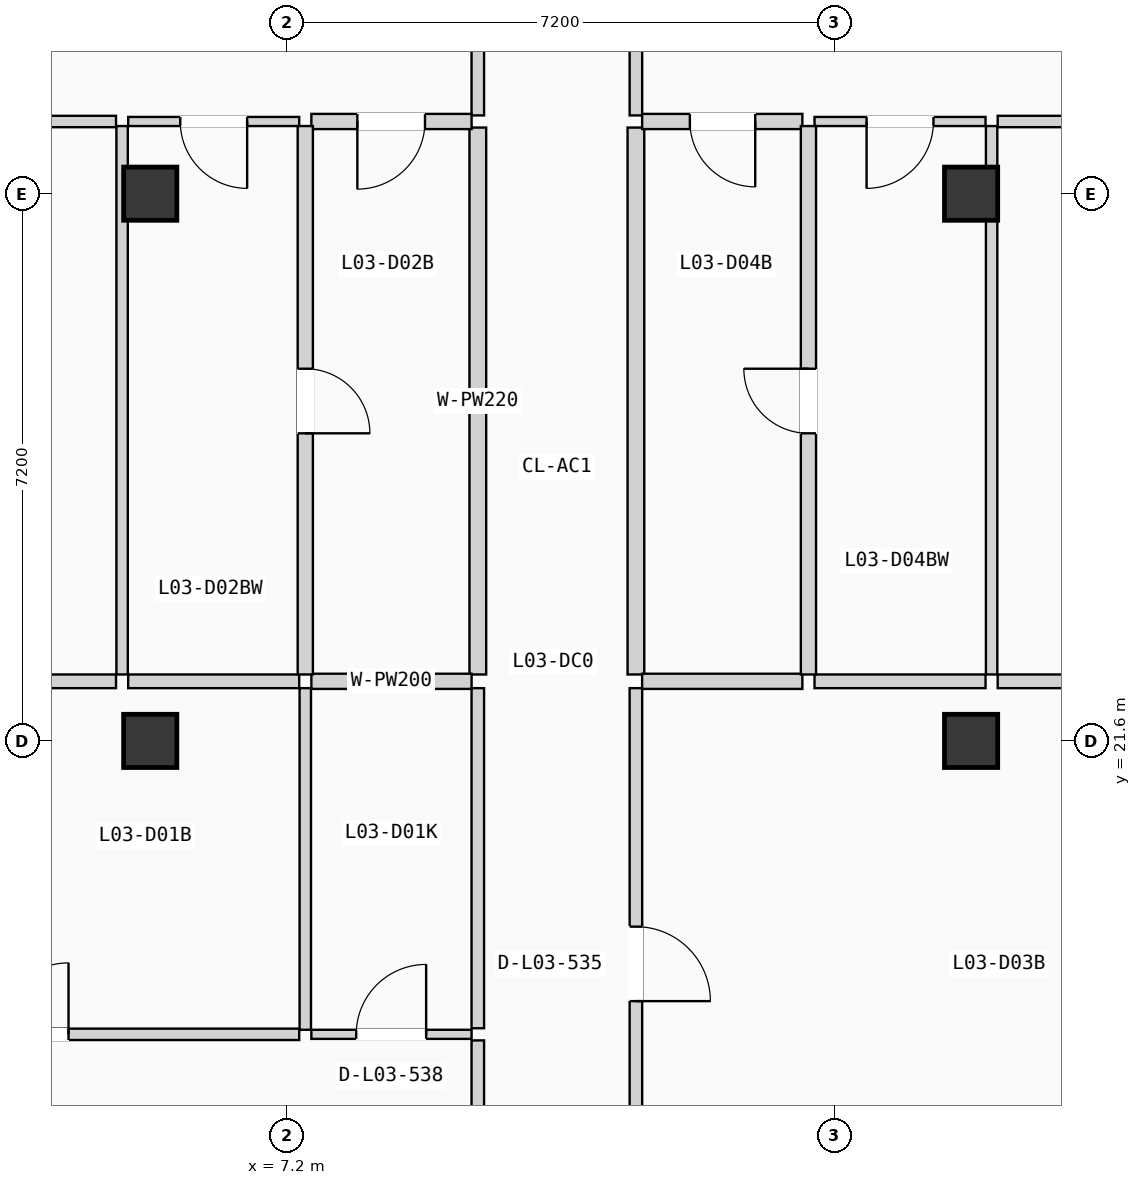
"""IFC4 building model, lengths in metres.
Left out: names, types, materials, properties, quantities, classifications, styles, units other than length and angle.
Written with IfcOpenShell. Run it as: python <this file> out.ifc"""

import sys

from ifc_helpers import new_model, si_unit, direction, frame, frame_2d, origin, origin_2d, place, context, subcontext, project, spatial, rectangle, extrude, element, fill, save


model = new_model("IFC4")
c1 = context("Model", 3, precision=1e-05, world=origin(), true_north=direction((0.0, 1.0)))
c2 = subcontext(c1, "Body", "Model", "MODEL_VIEW")
j1 = project(units=[si_unit("LENGTHUNIT", "METRE"), si_unit("PLANEANGLEUNIT", "RADIAN")], contexts=[c1])
p1 = place(None, origin())
s1 = spatial("IfcSite", under=j1, at=p1, CompositionType="ELEMENT")
p2 = place(p1, origin())
s2 = spatial("IfcBuilding", under=s1, at=p2, CompositionType="ELEMENT")
p3 = place(p2, frame((0.0, 0.0, 12.075)))
s3 = spatial("IfcBuildingStorey", under=s2, at=p3, CompositionType="ELEMENT", Elevation=12.075)
for number, where, z_axis, x_axis in (
    (1, (5.4, 21.6, 0.0), (0.0, 0.0, 1.0), (1.0, 0.0, 0.0)),
    (2, (5.4, 28.8, 0.0), (0.0, 0.0, 1.0), (1.0, 0.0, 0.0)),
    (3, (16.2, 21.6, 0.0), (0.0, 0.0, 1.0), (1.0, 0.0, 0.0)),
    (4, (16.2, 28.8, 0.0), (0.0, 0.0, 1.0), (1.0, 0.0, 0.0)),
):
    element("IfcColumn", number, at=place(p3, frame(where, z_axis=z_axis, x_axis=x_axis)), inside=s3, PredefinedType="COLUMN", context=c2, shape_type="SweptSolid", body=[
        extrude(rectangle(XDim=0.7, YDim=0.7, at=origin_2d()), origin(), (0.0, 0.0, 1.0), 3.15),
    ])
p4 = place(p3, frame((9.71, 12.235, 0.0), z_axis=(0.0, 0.0, 1.0), x_axis=(0.0, 1.0, 0.0)))
e5 = element("IfcWall", 5, at=p4, inside=s3, PredefinedType="PARTITIONING", context=c2, shape_type="SweptSolid", body=[
    extrude(rectangle(XDim=5.424, YDim=0.165, at=frame_2d((2.712, 0.0))), origin(), (0.0, 0.0, 1.0), 2.87),
])
p5 = place(p4, frame((2.207, 0.0, 0.0)))
e6 = element("IfcOpeningElement", 6, at=p5, cuts=e5, PredefinedType="OPENING", context=c2, shape_type="SweptSolid", body=[
    extrude(rectangle(XDim=1.01, YDim=2.11, at=frame_2d((0.505, 1.055))), frame((0.0, 0.093, 0.0), z_axis=(0.0, -1.0, 0.0), x_axis=(1.0, 0.0, 0.0)), (0.0, 0.0, 1.0), 0.185),
])
p6 = place(p3, frame((9.71, 17.819, 0.0), z_axis=(0.0, 0.0, 1.0), x_axis=(0.0, 1.0, 0.0)))
e7 = element("IfcWall", 7, at=p6, inside=s3, PredefinedType="PARTITIONING", context=c2, shape_type="SweptSolid", body=[
    extrude(rectangle(XDim=4.475, YDim=0.165, at=frame_2d((2.237, 0.0))), origin(), (0.0, 0.0, 1.0), 2.87),
])
p7 = place(p3, frame((9.71, 29.83, 0.0), z_axis=(0.0, 0.0, 1.0), x_axis=(0.0, 1.0, 0.0)))
e8 = element("IfcWall", 8, at=p7, inside=s3, PredefinedType="PARTITIONING", context=c2, shape_type="SweptSolid", body=[
    extrude(rectangle(XDim=5.14, YDim=0.165, at=frame_2d((2.57, 0.0))), origin(), (0.0, 0.0, 1.0), 2.87),
])
p8 = place(p7, frame((2.065, 0.0, 0.0)))
e9 = element("IfcOpeningElement", 9, at=p8, cuts=e8, PredefinedType="OPENING", context=c2, shape_type="SweptSolid", body=[
    extrude(rectangle(XDim=1.01, YDim=2.11, at=frame_2d((0.505, 1.055))), frame((0.0, 0.093, 0.0), z_axis=(0.0, -1.0, 0.0), x_axis=(1.0, 0.0, 0.0)), (0.0, 0.0, 1.0), 0.185),
])
p9 = place(p3, frame((9.71, 22.474, 0.0), z_axis=(0.0, 0.0, 1.0), x_axis=(0.0, 1.0, 0.0)))
e10 = element("IfcWall", 10, at=p9, inside=s3, PredefinedType="PLUMBINGWALL", context=c2, shape_type="SweptSolid", body=[
    extrude(rectangle(XDim=7.196, YDim=0.22, at=frame_2d((3.598, 0.0))), origin(), (0.0, 0.0, 1.0), 2.87),
])
p10 = place(p3, frame((11.79, 15.037, 0.0), z_axis=(0.0, 0.0, 1.0), x_axis=(0.0, 1.0, 0.0)))
e11 = element("IfcWall", 11, at=p10, inside=s3, PredefinedType="PARTITIONING", context=c2, shape_type="SweptSolid", body=[
    extrude(rectangle(XDim=7.257, YDim=0.165, at=frame_2d((3.628, 0.0))), origin(), (0.0, 0.0, 1.0), 2.87),
])
p11 = place(p10, frame((3.139, 0.0, 0.0)))
e12 = element("IfcOpeningElement", 12, at=p11, cuts=e11, PredefinedType="OPENING", context=c2, shape_type="SweptSolid", body=[
    extrude(rectangle(XDim=0.98, YDim=2.08, at=frame_2d((0.49, 1.04))), frame((0.0, 0.093, 0.0), z_axis=(0.0, -1.0, 0.0), x_axis=(1.0, 0.0, 0.0)), (0.0, 0.0, 1.0), 0.185),
])
p12 = place(p3, frame((11.79, 29.83, 0.0), z_axis=(0.0, 0.0, 1.0), x_axis=(0.0, 1.0, 0.0)))
e13 = element("IfcWall", 13, at=p12, inside=s3, PredefinedType="PARTITIONING", context=c2, shape_type="SweptSolid", body=[
    extrude(rectangle(XDim=5.14, YDim=0.165, at=frame_2d((2.57, 0.0))), origin(), (0.0, 0.0, 1.0), 2.87),
])
p13 = place(p12, frame((2.065, 0.0, 0.0)))
e14 = element("IfcOpeningElement", 14, at=p13, cuts=e13, PredefinedType="OPENING", context=c2, shape_type="SweptSolid", body=[
    extrude(rectangle(XDim=1.01, YDim=2.11, at=frame_2d((0.505, 1.055))), frame((0.0, 0.093, 0.0), z_axis=(0.0, -1.0, 0.0), x_axis=(1.0, 0.0, 0.0)), (0.0, 0.0, 1.0), 0.185),
])
p14 = place(p3, frame((11.79, 22.474, 0.0), z_axis=(0.0, 0.0, 1.0), x_axis=(0.0, 1.0, 0.0)))
e15 = element("IfcWall", 15, at=p14, inside=s3, PredefinedType="PLUMBINGWALL", context=c2, shape_type="SweptSolid", body=[
    extrude(rectangle(XDim=7.196, YDim=0.22, at=frame_2d((3.598, 0.0))), origin(), (0.0, 0.0, 1.0), 2.87),
])
p15 = place(p3, frame((7.52, 17.739, 0.0), z_axis=(0.0, 0.0, 1.0), x_axis=(1.0, 0.0, 0.0)))
e16 = element("IfcWall", 16, at=p15, inside=s3, PredefinedType="PARTITIONING", context=c2, shape_type="SweptSolid", body=[
    extrude(rectangle(XDim=2.108, YDim=0.12, at=frame_2d((1.054, 0.0))), origin(), (0.0, 0.0, 1.0), 2.87),
])
p16 = place(p15, frame((0.59, 0.0, 0.0)))
e17 = element("IfcOpeningElement", 17, at=p16, cuts=e16, PredefinedType="OPENING", context=c2, shape_type="SweptSolid", body=[
    extrude(rectangle(XDim=0.92, YDim=2.02, at=frame_2d((0.46, 1.01))), frame((0.0, 0.07, 0.0), z_axis=(0.0, -1.0, 0.0), x_axis=(1.0, 0.0, 0.0)), (0.0, 0.0, 1.0), 0.14),
])
p17 = place(p3, frame((0.35, 17.739, 0.0), z_axis=(0.0, 0.0, 1.0), x_axis=(1.0, 0.0, 0.0)))
e18 = element("IfcWall", 18, at=p17, inside=s3, PredefinedType="PARTITIONING", context=c2, shape_type="SweptSolid", body=[
    extrude(rectangle(XDim=7.01, YDim=0.15, at=frame_2d((3.505, 0.0))), origin(), (0.0, 0.0, 1.0), 2.87),
])
p18 = place(p17, frame((3.035, 0.0, 0.0)))
e19 = element("IfcOpeningElement", 19, at=p18, cuts=e18, PredefinedType="OPENING", context=c2, shape_type="SweptSolid", body=[
    extrude(rectangle(XDim=0.94, YDim=2.06, at=frame_2d((0.47, 1.03))), frame((0.0, 0.085, 0.0), z_axis=(0.0, -1.0, 0.0), x_axis=(1.0, 0.0, 0.0)), (0.0, 0.0, 1.0), 0.17),
])
p19 = place(p3, frame((7.44, 17.799, 0.0), z_axis=(0.0, 0.0, 1.0), x_axis=(0.0, 1.0, 0.0)))
e20 = element("IfcWall", 20, at=p19, inside=s3, PredefinedType="PARTITIONING", context=c2, shape_type="SweptSolid", body=[
    extrude(rectangle(XDim=4.495, YDim=0.15, at=frame_2d((2.248, 0.0))), origin(), (0.0, 0.0, 1.0), 2.87),
])
p20 = place(p3, frame((7.52, 22.384, 0.0), z_axis=(0.0, 0.0, 1.0), x_axis=(1.0, 0.0, 0.0)))
e21 = element("IfcWall", 21, at=p20, inside=s3, PredefinedType="PLUMBINGWALL", context=c2, shape_type="SweptSolid", body=[
    extrude(rectangle(XDim=2.108, YDim=0.2, at=frame_2d((1.054, 0.0))), origin(), (0.0, 0.0, 1.0), 2.87),
])
p21 = place(p3, frame((0.35, 22.384, 0.0), z_axis=(0.0, 0.0, 1.0), x_axis=(1.0, 0.0, 0.0)))
e22 = element("IfcWall", 22, at=p21, inside=s3, PredefinedType="PARTITIONING", context=c2, shape_type="SweptSolid", body=[
    extrude(rectangle(XDim=4.6, YDim=0.18, at=frame_2d((2.3, 0.0))), origin(), (0.0, 0.0, 1.0), 2.87),
])
p22 = place(p3, frame((5.11, 22.384, 0.0), z_axis=(0.0, 0.0, 1.0), x_axis=(1.0, 0.0, 0.0)))
e23 = element("IfcWall", 23, at=p22, inside=s3, PredefinedType="PARTITIONING", context=c2, shape_type="SweptSolid", body=[
    extrude(rectangle(XDim=2.25, YDim=0.18, at=frame_2d((1.125, 0.0))), origin(), (0.0, 0.0, 1.0), 2.87),
])
p23 = place(p3, frame((7.52, 29.75, 0.0), z_axis=(0.0, 0.0, 1.0), x_axis=(1.0, 0.0, 0.0)))
e24 = element("IfcWall", 24, at=p23, inside=s3, PredefinedType="PLUMBINGWALL", context=c2, shape_type="SweptSolid", body=[
    extrude(rectangle(XDim=2.108, YDim=0.2, at=frame_2d((1.054, 0.0))), origin(), (0.0, 0.0, 1.0), 2.87),
])
p24 = place(p23, frame((0.605, 0.0, 0.0)))
e25 = element("IfcOpeningElement", 25, at=p24, cuts=e24, PredefinedType="OPENING", context=c2, shape_type="SweptSolid", body=[
    extrude(rectangle(XDim=0.89, YDim=2.03, at=frame_2d((0.445, 1.015))), frame((0.0, 0.11, 0.0), z_axis=(0.0, -1.0, 0.0), x_axis=(1.0, 0.0, 0.0)), (0.0, 0.0, 1.0), 0.22),
])
p25 = place(p3, frame((0.35, 29.75, 0.0), z_axis=(0.0, 0.0, 1.0), x_axis=(1.0, 0.0, 0.0)))
e26 = element("IfcWall", 26, at=p25, inside=s3, PredefinedType="PARTITIONING", context=c2, shape_type="SweptSolid", body=[
    extrude(rectangle(XDim=4.6, YDim=0.15, at=frame_2d((2.3, 0.0))), origin(), (0.0, 0.0, 1.0), 2.87),
])
p26 = place(p25, frame((1.85, 0.0, 0.0)))
e27 = element("IfcOpeningElement", 27, at=p26, cuts=e26, PredefinedType="OPENING", context=c2, shape_type="SweptSolid", body=[
    extrude(rectangle(XDim=0.9, YDim=2.04, at=frame_2d((0.45, 1.02))), frame((0.0, 0.085, 0.0), z_axis=(0.0, -1.0, 0.0), x_axis=(1.0, 0.0, 0.0)), (0.0, 0.0, 1.0), 0.17),
])
p27 = place(p3, frame((5.11, 29.75, 0.0), z_axis=(0.0, 0.0, 1.0), x_axis=(1.0, 0.0, 0.0)))
e28 = element("IfcWall", 28, at=p27, inside=s3, PredefinedType="PARTITIONING", context=c2, shape_type="SweptSolid", body=[
    extrude(rectangle(XDim=2.25, YDim=0.12, at=frame_2d((1.125, 0.0))), origin(), (0.0, 0.0, 1.0), 2.87),
])
p28 = place(p27, frame((0.685, 0.0, 0.0)))
e29 = element("IfcOpeningElement", 29, at=p28, cuts=e28, PredefinedType="OPENING", context=c2, shape_type="SweptSolid", body=[
    extrude(rectangle(XDim=0.88, YDim=2.02, at=frame_2d((0.44, 1.01))), frame((0.0, 0.07, 0.0), z_axis=(0.0, -1.0, 0.0), x_axis=(1.0, 0.0, 0.0)), (0.0, 0.0, 1.0), 0.14),
])
p29 = place(p3, frame((7.44, 22.474, 0.0), z_axis=(0.0, 0.0, 1.0), x_axis=(0.0, 1.0, 0.0)))
e30 = element("IfcWall", 30, at=p29, inside=s3, PredefinedType="PLUMBINGWALL", context=c2, shape_type="SweptSolid", body=[
    extrude(rectangle(XDim=7.216, YDim=0.2, at=frame_2d((3.608, 0.0))), origin(), (0.0, 0.0, 1.0), 2.87),
])
p30 = place(p29, frame((3.173, 0.0, 0.0)))
e31 = element("IfcOpeningElement", 31, at=p30, cuts=e30, PredefinedType="OPENING", context=c2, shape_type="SweptSolid", body=[
    extrude(rectangle(XDim=0.85, YDim=2.01, at=frame_2d((0.425, 1.005))), frame((0.0, 0.11, 0.0), z_axis=(0.0, -1.0, 0.0), x_axis=(1.0, 0.0, 0.0)), (0.0, 0.0, 1.0), 0.22),
])
p31 = place(p3, frame((5.03, 22.474, 0.0), z_axis=(0.0, 0.0, 1.0), x_axis=(0.0, 1.0, 0.0)))
e32 = element("IfcWall", 32, at=p31, inside=s3, PredefinedType="PARTITIONING", context=c2, shape_type="SweptSolid", body=[
    extrude(rectangle(XDim=7.216, YDim=0.15, at=frame_2d((3.608, 0.0))), origin(), (0.0, 0.0, 1.0), 2.87),
])
p32 = place(p3, frame((11.872, 22.384, 0.0), z_axis=(0.0, 0.0, 1.0), x_axis=(1.0, 0.0, 0.0)))
e33 = element("IfcWall", 33, at=p32, inside=s3, PredefinedType="PLUMBINGWALL", context=c2, shape_type="SweptSolid", body=[
    extrude(rectangle(XDim=2.108, YDim=0.2, at=frame_2d((1.054, 0.0))), origin(), (0.0, 0.0, 1.0), 2.87),
])
p33 = place(p3, frame((16.55, 22.384, 0.0), z_axis=(0.0, 0.0, 1.0), x_axis=(1.0, 0.0, 0.0)))
e34 = element("IfcWall", 34, at=p33, inside=s3, PredefinedType="PARTITIONING", context=c2, shape_type="SweptSolid", body=[
    extrude(rectangle(XDim=4.7, YDim=0.18, at=frame_2d((2.35, 0.0))), origin(), (0.0, 0.0, 1.0), 2.87),
])
p34 = place(p3, frame((14.14, 22.384, 0.0), z_axis=(0.0, 0.0, 1.0), x_axis=(1.0, 0.0, 0.0)))
e35 = element("IfcWall", 35, at=p34, inside=s3, PredefinedType="PARTITIONING", context=c2, shape_type="SweptSolid", body=[
    extrude(rectangle(XDim=2.25, YDim=0.18, at=frame_2d((1.125, 0.0))), origin(), (0.0, 0.0, 1.0), 2.87),
])
p35 = place(p3, frame((11.872, 29.75, 0.0), z_axis=(0.0, 0.0, 1.0), x_axis=(1.0, 0.0, 0.0)))
e36 = element("IfcWall", 36, at=p35, inside=s3, PredefinedType="PLUMBINGWALL", context=c2, shape_type="SweptSolid", body=[
    extrude(rectangle(XDim=2.108, YDim=0.2, at=frame_2d((1.054, 0.0))), origin(), (0.0, 0.0, 1.0), 2.87),
])
p36 = place(p35, frame((0.628, 0.0, 0.0)))
e37 = element("IfcOpeningElement", 37, at=p36, cuts=e36, PredefinedType="OPENING", context=c2, shape_type="SweptSolid", body=[
    extrude(rectangle(XDim=0.86, YDim=2.0, at=frame_2d((0.43, 1.0))), frame((0.0, 0.11, 0.0), z_axis=(0.0, -1.0, 0.0), x_axis=(1.0, 0.0, 0.0)), (0.0, 0.0, 1.0), 0.22),
])
p37 = place(p3, frame((16.55, 29.75, 0.0), z_axis=(0.0, 0.0, 1.0), x_axis=(1.0, 0.0, 0.0)))
e38 = element("IfcWall", 38, at=p37, inside=s3, PredefinedType="PARTITIONING", context=c2, shape_type="SweptSolid", body=[
    extrude(rectangle(XDim=4.7, YDim=0.15, at=frame_2d((2.35, 0.0))), origin(), (0.0, 0.0, 1.0), 2.87),
])
p38 = place(p37, frame((1.83, 0.0, 0.0)))
e39 = element("IfcOpeningElement", 39, at=p38, cuts=e38, PredefinedType="OPENING", context=c2, shape_type="SweptSolid", body=[
    extrude(rectangle(XDim=1.04, YDim=2.08, at=frame_2d((0.52, 1.04))), frame((0.0, 0.085, 0.0), z_axis=(0.0, -1.0, 0.0), x_axis=(1.0, 0.0, 0.0)), (0.0, 0.0, 1.0), 0.17),
])
p39 = place(p3, frame((14.14, 29.75, 0.0), z_axis=(0.0, 0.0, 1.0), x_axis=(1.0, 0.0, 0.0)))
e40 = element("IfcWall", 40, at=p39, inside=s3, PredefinedType="PARTITIONING", context=c2, shape_type="SweptSolid", body=[
    extrude(rectangle(XDim=2.25, YDim=0.12, at=frame_2d((1.125, 0.0))), origin(), (0.0, 0.0, 1.0), 2.87),
])
p40 = place(p39, frame((0.685, 0.0, 0.0)))
e41 = element("IfcOpeningElement", 41, at=p40, cuts=e40, PredefinedType="OPENING", context=c2, shape_type="SweptSolid", body=[
    extrude(rectangle(XDim=0.88, YDim=2.02, at=frame_2d((0.44, 1.01))), frame((0.0, 0.07, 0.0), z_axis=(0.0, -1.0, 0.0), x_axis=(1.0, 0.0, 0.0)), (0.0, 0.0, 1.0), 0.14),
])
p41 = place(p3, frame((14.06, 22.474, 0.0), z_axis=(0.0, 0.0, 1.0), x_axis=(0.0, 1.0, 0.0)))
e42 = element("IfcWall", 42, at=p41, inside=s3, PredefinedType="PLUMBINGWALL", context=c2, shape_type="SweptSolid", body=[
    extrude(rectangle(XDim=7.216, YDim=0.2, at=frame_2d((3.608, 0.0))), origin(), (0.0, 0.0, 1.0), 2.87),
])
p42 = place(p41, frame((3.173, 0.0, 0.0)))
e43 = element("IfcOpeningElement", 43, at=p42, cuts=e42, PredefinedType="OPENING", context=c2, shape_type="SweptSolid", body=[
    extrude(rectangle(XDim=0.85, YDim=2.01, at=frame_2d((0.425, 1.005))), frame((0.0, 0.11, 0.0), z_axis=(0.0, -1.0, 0.0), x_axis=(1.0, 0.0, 0.0)), (0.0, 0.0, 1.0), 0.22),
])
p43 = place(p3, frame((16.47, 22.474, 0.0), z_axis=(0.0, 0.0, 1.0), x_axis=(0.0, 1.0, 0.0)))
e44 = element("IfcWall", 44, at=p43, inside=s3, PredefinedType="PARTITIONING", context=c2, shape_type="SweptSolid", body=[
    extrude(rectangle(XDim=7.216, YDim=0.15, at=frame_2d((3.608, 0.0))), origin(), (0.0, 0.0, 1.0), 2.87),
])
p44 = place(p11, frame((0.98, 0.0, 0.0), z_axis=(0.0, 0.0, 1.0), x_axis=(-1.0, 0.0, 0.0)))
e45 = element("IfcDoor", 45, at=p44, inside=s3, OperationType="SINGLE_SWING_LEFT", PredefinedType="DOOR", context=c2, shape_type="SweptSolid", body=[
    extrude(rectangle(XDim=0.98, YDim=2.08, at=frame_2d((0.49, 1.04))), frame((0.0, 0.025, 0.0), z_axis=(0.0, -1.0, 0.0), x_axis=(1.0, 0.0, 0.0)), (0.0, 0.0, 1.0), 0.05),
])
fill(e12, e45)
p45 = place(p16, origin())
e46 = element("IfcDoor", 46, at=p45, inside=s3, OperationType="SINGLE_SWING_RIGHT", PredefinedType="DOOR", context=c2, shape_type="SweptSolid", body=[
    extrude(rectangle(XDim=0.92, YDim=2.02, at=frame_2d((0.46, 1.01))), frame((0.0, 0.025, 0.0), z_axis=(0.0, -1.0, 0.0), x_axis=(1.0, 0.0, 0.0)), (0.0, 0.0, 1.0), 0.05),
])
fill(e17, e46)
p46 = place(p18, origin())
e47 = element("IfcDoor", 47, at=p46, inside=s3, OperationType="SINGLE_SWING_RIGHT", PredefinedType="DOOR", context=c2, shape_type="SweptSolid", body=[
    extrude(rectangle(XDim=0.94, YDim=2.06, at=frame_2d((0.47, 1.03))), frame((0.0, 0.025, 0.0), z_axis=(0.0, -1.0, 0.0), x_axis=(1.0, 0.0, 0.0)), (0.0, 0.0, 1.0), 0.05),
])
fill(e19, e47)
p47 = place(p24, frame((0.89, 0.0, 0.0), z_axis=(0.0, 0.0, 1.0), x_axis=(-1.0, 0.0, 0.0)))
e48 = element("IfcDoor", 48, at=p47, inside=s3, OperationType="SINGLE_SWING_LEFT", PredefinedType="DOOR", context=c2, shape_type="SweptSolid", body=[
    extrude(rectangle(XDim=0.89, YDim=2.03, at=frame_2d((0.445, 1.015))), frame((0.0, 0.025, 0.0), z_axis=(0.0, -1.0, 0.0), x_axis=(1.0, 0.0, 0.0)), (0.0, 0.0, 1.0), 0.05),
])
fill(e25, e48)
p48 = place(p28, frame((0.88, 0.0, 0.0), z_axis=(0.0, 0.0, 1.0), x_axis=(-1.0, 0.0, 0.0)))
e49 = element("IfcDoor", 49, at=p48, inside=s3, OperationType="SINGLE_SWING_RIGHT", PredefinedType="DOOR", context=c2, shape_type="SweptSolid", body=[
    extrude(rectangle(XDim=0.88, YDim=2.02, at=frame_2d((0.44, 1.01))), frame((0.0, 0.025, 0.0), z_axis=(0.0, -1.0, 0.0), x_axis=(1.0, 0.0, 0.0)), (0.0, 0.0, 1.0), 0.05),
])
fill(e29, e49)
p49 = place(p30, frame((0.85, 0.0, 0.0), z_axis=(0.0, 0.0, 1.0), x_axis=(-1.0, 0.0, 0.0)))
e50 = element("IfcDoor", 50, at=p49, inside=s3, OperationType="SINGLE_SWING_LEFT", PredefinedType="DOOR", context=c2, shape_type="SweptSolid", body=[
    extrude(rectangle(XDim=0.85, YDim=2.01, at=frame_2d((0.425, 1.005))), frame((0.0, 0.025, 0.0), z_axis=(0.0, -1.0, 0.0), x_axis=(1.0, 0.0, 0.0)), (0.0, 0.0, 1.0), 0.05),
])
fill(e31, e50)
p50 = place(p36, frame((0.86, 0.0, 0.0), z_axis=(0.0, 0.0, 1.0), x_axis=(-1.0, 0.0, 0.0)))
e51 = element("IfcDoor", 51, at=p50, inside=s3, OperationType="SINGLE_SWING_RIGHT", PredefinedType="DOOR", context=c2, shape_type="SweptSolid", body=[
    extrude(rectangle(XDim=0.86, YDim=2.0, at=frame_2d((0.43, 1.0))), frame((0.0, 0.025, 0.0), z_axis=(0.0, -1.0, 0.0), x_axis=(1.0, 0.0, 0.0)), (0.0, 0.0, 1.0), 0.05),
])
fill(e37, e51)
p51 = place(p40, frame((0.88, 0.0, 0.0), z_axis=(0.0, 0.0, 1.0), x_axis=(-1.0, 0.0, 0.0)))
e52 = element("IfcDoor", 52, at=p51, inside=s3, OperationType="SINGLE_SWING_LEFT", PredefinedType="DOOR", context=c2, shape_type="SweptSolid", body=[
    extrude(rectangle(XDim=0.88, YDim=2.02, at=frame_2d((0.44, 1.01))), frame((0.0, 0.025, 0.0), z_axis=(0.0, -1.0, 0.0), x_axis=(1.0, 0.0, 0.0)), (0.0, 0.0, 1.0), 0.05),
])
fill(e41, e52)
p52 = place(p42, origin())
e53 = element("IfcDoor", 53, at=p52, inside=s3, OperationType="SINGLE_SWING_RIGHT", PredefinedType="DOOR", context=c2, shape_type="SweptSolid", body=[
    extrude(rectangle(XDim=0.85, YDim=2.01, at=frame_2d((0.425, 1.005))), frame((0.0, 0.025, 0.0), z_axis=(0.0, -1.0, 0.0), x_axis=(1.0, 0.0, 0.0)), (0.0, 0.0, 1.0), 0.05),
])
fill(e43, e53)
save(model, sys.argv[1])
